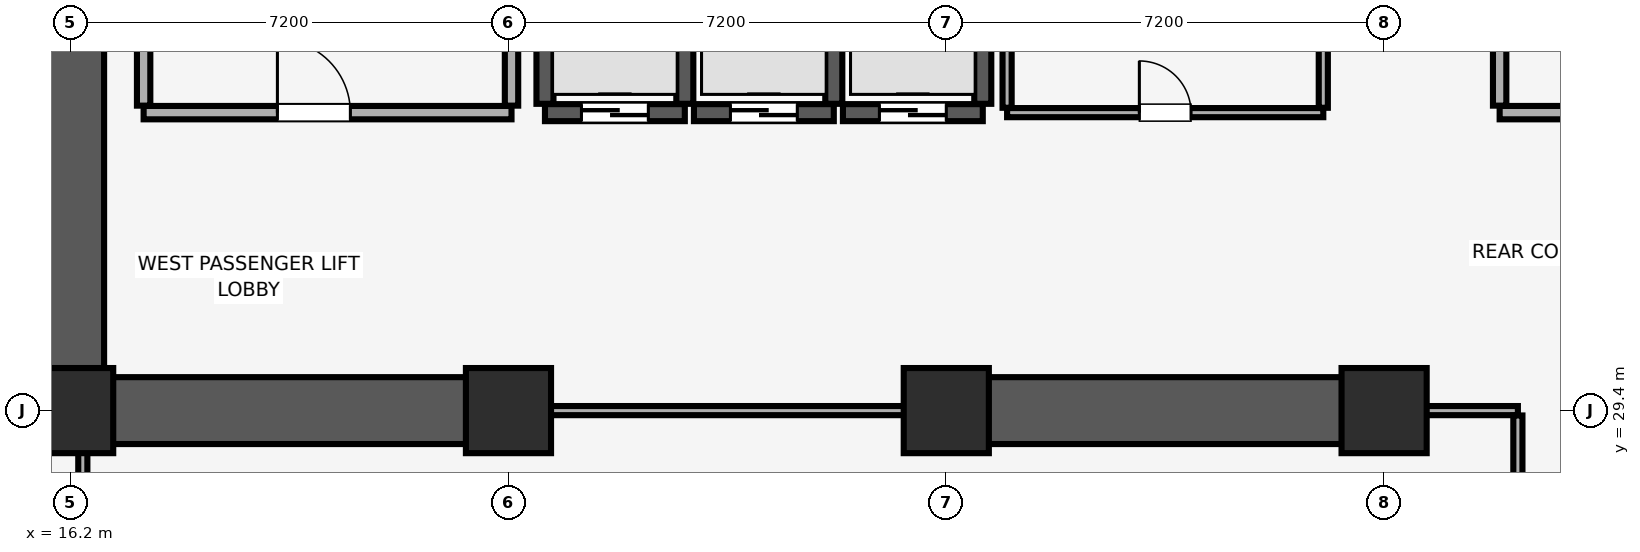
"""IFC4 building model, lengths in metres.
Left out: names, types, materials, properties, quantities, classifications, styles, units other than length and angle.
Written with IfcOpenShell. Run it as: python <this file> out.ifc"""

import sys

from ifc_helpers import new_model, si_unit, direction, frame, frame_2d, origin, origin_2d, place, context, subcontext, project, spatial, rectangle, extrude, element, fill, save


model = new_model("IFC4")
c1 = context("Model", 3, precision=1e-05, world=origin(), true_north=direction((0.0, 1.0)))
c2 = subcontext(c1, "Body", "Model", "MODEL_VIEW")
j1 = project(units=[si_unit("LENGTHUNIT", "METRE"), si_unit("PLANEANGLEUNIT", "RADIAN")], contexts=[c1])
p1 = place(None, origin())
s1 = spatial("IfcSite", under=j1, at=p1, CompositionType="ELEMENT")
p2 = place(p1, origin())
s2 = spatial("IfcBuilding", under=s1, at=p2, CompositionType="ELEMENT")
p3 = place(p2, frame((0.0, 0.0, 26.0)))
s3 = spatial("IfcBuildingStorey", under=s2, at=p3, CompositionType="ELEMENT", Elevation=26.0)
for number, where, z_axis, x_axis in (
    (1, (16.2, 29.4, 0.0), (0.0, 0.0, 1.0), (1.0, 0.0, 0.0)),
    (2, (23.4, 29.4, 0.0), (0.0, 0.0, 1.0), (1.0, 0.0, 0.0)),
    (3, (30.6, 29.4, 0.0), (0.0, 0.0, 1.0), (1.0, 0.0, 0.0)),
    (4, (37.8, 29.4, 0.0), (0.0, 0.0, 1.0), (1.0, 0.0, 0.0)),
):
    element("IfcColumn", number, at=place(p3, frame(where, z_axis=z_axis, x_axis=x_axis)), inside=s3, PredefinedType="COLUMN", context=c2, shape_type="SweptSolid", body=[
        extrude(rectangle(XDim=1.4, YDim=1.4, at=origin_2d()), origin(), (0.0, 0.0, 1.0), 5.16),
    ])
p4 = place(p3, frame((16.2, 29.4, 0.0), z_axis=(0.0, 0.0, 1.0), x_axis=(0.0, 1.0, 0.0)))
e5 = element("IfcWall", 5, at=p4, inside=s3, PredefinedType="SHEAR", context=c2, shape_type="SweptSolid", body=[
    extrude(rectangle(XDim=19.2, YDim=1.1, at=frame_2d((9.6, 0.0))), origin(), (0.0, 0.0, 1.0), 5.12),
])
p5 = place(p3, frame((16.755, 29.4, 0.0), z_axis=(0.0, 0.0, 1.0), x_axis=(1.0, 0.0, 0.0)))
e6 = element("IfcWall", 6, at=p5, inside=s3, PredefinedType="SHEAR", context=c2, shape_type="SweptSolid", body=[
    extrude(rectangle(XDim=6.845, YDim=1.1, at=frame_2d((3.423, 0.0))), origin(), (0.0, 0.0, 1.0), 5.12),
])
p6 = place(p3, frame((30.4, 29.4, 0.0), z_axis=(0.0, 0.0, 1.0), x_axis=(1.0, 0.0, 0.0)))
e7 = element("IfcWall", 7, at=p6, inside=s3, PredefinedType="SHEAR", context=c2, shape_type="SweptSolid", body=[
    extrude(rectangle(XDim=7.6, YDim=1.1, at=frame_2d((3.8, 0.0))), origin(), (0.0, 0.0, 1.0), 5.12),
])
p7 = place(p3, frame((24.0, 34.3, 0.0), z_axis=(0.0, 0.0, 1.0), x_axis=(1.0, 0.0, 0.0)))
e8 = element("IfcWall", 8, at=p7, inside=s3, PredefinedType="SHEAR", context=c2, shape_type="SweptSolid", body=[
    extrude(rectangle(XDim=2.3, YDim=0.28, at=frame_2d((1.15, 0.0))), origin(), (0.0, 0.0, 1.0), 5.12),
])
p8 = place(p7, frame((0.6, 0.0, 0.0)))
e9 = element("IfcOpeningElement", 9, at=p8, cuts=e8, PredefinedType="OPENING", context=c2, shape_type="SweptSolid", body=[
    extrude(rectangle(XDim=1.1, YDim=2.2, at=frame_2d((0.55, 1.1))), frame((0.0, 0.15, 0.0), z_axis=(0.0, -1.0, 0.0), x_axis=(1.0, 0.0, 0.0)), (0.0, 0.0, 1.0), 0.3),
])
for number, where, z_axis, x_axis in (
    (10, (24.0, 34.445, 0.0), (0.0, 0.0, 1.0), (0.0, 1.0, 0.0)),
    (11, (26.3, 34.445, 0.0), (0.0, 0.0, 1.0), (0.0, 1.0, 0.0)),
):
    element("IfcWall", number, at=place(p3, frame(where, z_axis=z_axis, x_axis=x_axis)), inside=s3, PredefinedType="SHEAR", context=c2, shape_type="SweptSolid", body=[
        extrude(rectangle(XDim=2.01, YDim=0.28, at=frame_2d((1.005, 0.0))), origin(), (0.0, 0.0, 1.0), 5.12),
    ])
p9 = place(p3, frame((26.45, 34.3, 0.0), z_axis=(0.0, 0.0, 1.0), x_axis=(1.0, 0.0, 0.0)))
e12 = element("IfcWall", 12, at=p9, inside=s3, PredefinedType="SHEAR", context=c2, shape_type="SweptSolid", body=[
    extrude(rectangle(XDim=2.3, YDim=0.28, at=frame_2d((1.15, 0.0))), origin(), (0.0, 0.0, 1.0), 5.12),
])
p10 = place(p9, frame((0.6, 0.0, 0.0)))
e13 = element("IfcOpeningElement", 13, at=p10, cuts=e12, PredefinedType="OPENING", context=c2, shape_type="SweptSolid", body=[
    extrude(rectangle(XDim=1.1, YDim=2.2, at=frame_2d((0.55, 1.1))), frame((0.0, 0.15, 0.0), z_axis=(0.0, -1.0, 0.0), x_axis=(1.0, 0.0, 0.0)), (0.0, 0.0, 1.0), 0.3),
])
p11 = place(p3, frame((28.75, 34.445, 0.0), z_axis=(0.0, 0.0, 1.0), x_axis=(0.0, 1.0, 0.0)))
e14 = element("IfcWall", 14, at=p11, inside=s3, PredefinedType="SHEAR", context=c2, shape_type="SweptSolid", body=[
    extrude(rectangle(XDim=2.01, YDim=0.28, at=frame_2d((1.005, 0.0))), origin(), (0.0, 0.0, 1.0), 5.12),
])
p12 = place(p3, frame((28.9, 34.3, 0.0), z_axis=(0.0, 0.0, 1.0), x_axis=(1.0, 0.0, 0.0)))
e15 = element("IfcWall", 15, at=p12, inside=s3, PredefinedType="SHEAR", context=c2, shape_type="SweptSolid", body=[
    extrude(rectangle(XDim=2.3, YDim=0.28, at=frame_2d((1.15, 0.0))), origin(), (0.0, 0.0, 1.0), 5.12),
])
p13 = place(p12, frame((0.6, 0.0, 0.0)))
e16 = element("IfcOpeningElement", 16, at=p13, cuts=e15, PredefinedType="OPENING", context=c2, shape_type="SweptSolid", body=[
    extrude(rectangle(XDim=1.1, YDim=2.2, at=frame_2d((0.55, 1.1))), frame((0.0, 0.15, 0.0), z_axis=(0.0, -1.0, 0.0), x_axis=(1.0, 0.0, 0.0)), (0.0, 0.0, 1.0), 0.3),
])
p14 = place(p3, frame((31.2, 34.445, 0.0), z_axis=(0.0, 0.0, 1.0), x_axis=(0.0, 1.0, 0.0)))
e17 = element("IfcWall", 17, at=p14, inside=s3, PredefinedType="SHEAR", context=c2, shape_type="SweptSolid", body=[
    extrude(rectangle(XDim=2.01, YDim=0.28, at=frame_2d((1.005, 0.0))), origin(), (0.0, 0.0, 1.0), 5.12),
])
p15 = place(p3, frame((17.4, 34.3, 0.0), z_axis=(0.0, 0.0, 1.0), x_axis=(1.0, 0.0, 0.0)))
e18 = element("IfcWall", 18, at=p15, inside=s3, PredefinedType="PARTITIONING", context=c2, shape_type="SweptSolid", body=[
    extrude(rectangle(XDim=6.05, YDim=0.22, at=frame_2d((3.025, 0.0))), origin(), (0.0, 0.0, 1.0), 5.12),
])
p16 = place(p15, frame((2.2, 0.0, 0.0)))
e19 = element("IfcOpeningElement", 19, at=p16, cuts=e18, PredefinedType="OPENING", context=c2, shape_type="SweptSolid", body=[
    extrude(rectangle(XDim=1.2, YDim=2.15, at=frame_2d((0.6, 1.075))), frame((0.0, 0.12, 0.0), z_axis=(0.0, -1.0, 0.0), x_axis=(1.0, 0.0, 0.0)), (0.0, 0.0, 1.0), 0.24),
])
p17 = place(p3, frame((17.4, 34.415, 0.0), z_axis=(0.0, 0.0, 1.0), x_axis=(0.0, 1.0, 0.0)))
e20 = element("IfcWall", 20, at=p17, inside=s3, PredefinedType="PARTITIONING", context=c2, shape_type="SweptSolid", body=[
    extrude(rectangle(XDim=5.43, YDim=0.22, at=frame_2d((2.715, 0.0))), origin(), (0.0, 0.0, 1.0), 5.12),
])
p18 = place(p3, frame((23.45, 34.415, 0.0), z_axis=(0.0, 0.0, 1.0), x_axis=(0.0, 1.0, 0.0)))
e21 = element("IfcWall", 21, at=p18, inside=s3, PredefinedType="PARTITIONING", context=c2, shape_type="SweptSolid", body=[
    extrude(rectangle(XDim=5.64, YDim=0.22, at=frame_2d((2.82, 0.0))), origin(), (0.0, 0.0, 1.0), 5.12),
])
p19 = place(p3, frame((39.7, 34.3, 0.0), z_axis=(0.0, 0.0, 1.0), x_axis=(1.0, 0.0, 0.0)))
e22 = element("IfcWall", 22, at=p19, inside=s3, PredefinedType="PARTITIONING", context=c2, shape_type="SweptSolid", body=[
    extrude(rectangle(XDim=4.6, YDim=0.22, at=frame_2d((2.3, 0.0))), origin(), (0.0, 0.0, 1.0), 5.12),
])
p20 = place(p19, frame((1.7, 0.0, 0.0)))
e23 = element("IfcOpeningElement", 23, at=p20, cuts=e22, PredefinedType="OPENING", context=c2, shape_type="SweptSolid", body=[
    extrude(rectangle(XDim=1.2, YDim=2.15, at=frame_2d((0.6, 1.075))), frame((0.0, 0.12, 0.0), z_axis=(0.0, -1.0, 0.0), x_axis=(1.0, 0.0, 0.0)), (0.0, 0.0, 1.0), 0.24),
])
p21 = place(p3, frame((39.7, 34.415, 0.0), z_axis=(0.0, 0.0, 1.0), x_axis=(0.0, 1.0, 0.0)))
e24 = element("IfcWall", 24, at=p21, inside=s3, PredefinedType="PARTITIONING", context=c2, shape_type="SweptSolid", body=[
    extrude(rectangle(XDim=5.785, YDim=0.22, at=frame_2d((2.893, 0.0))), origin(), (0.0, 0.0, 1.0), 5.12),
])
p22 = place(p3, frame((31.6, 34.3, 0.0), z_axis=(0.0, 0.0, 1.0), x_axis=(1.0, 0.0, 0.0)))
e25 = element("IfcWall", 25, at=p22, inside=s3, PredefinedType="PARTITIONING", context=c2, shape_type="SweptSolid", body=[
    extrude(rectangle(XDim=5.2, YDim=0.15, at=frame_2d((2.6, 0.0))), origin(), (0.0, 0.0, 1.0), 5.12),
])
p23 = place(p22, frame((2.175, 0.0, 0.0)))
e26 = element("IfcOpeningElement", 26, at=p23, cuts=e25, PredefinedType="OPENING", context=c2, shape_type="SweptSolid", body=[
    extrude(rectangle(XDim=0.85, YDim=2.1, at=frame_2d((0.425, 1.05))), frame((0.0, 0.085, 0.0), z_axis=(0.0, -1.0, 0.0), x_axis=(1.0, 0.0, 0.0)), (0.0, 0.0, 1.0), 0.17),
])
for number, where, z_axis, x_axis in (
    (27, (31.6, 34.38, 0.0), (0.0, 0.0, 1.0), (0.0, 1.0, 0.0)),
    (28, (36.8, 34.38, 0.0), (0.0, 0.0, 1.0), (0.0, 1.0, 0.0)),
):
    element("IfcWall", number, at=place(p3, frame(where, z_axis=z_axis, x_axis=x_axis)), inside=s3, PredefinedType="PARTITIONING", context=c2, shape_type="SweptSolid", body=[
        extrude(rectangle(XDim=4.94, YDim=0.15, at=frame_2d((2.47, 0.0))), origin(), (0.0, 0.0, 1.0), 5.12),
    ])
p24 = place(p3, frame((23.61, 29.4, 0.0), z_axis=(0.0, 0.0, 1.0), x_axis=(1.0, 0.0, 0.0)))
e29 = element("IfcWall", 29, at=p24, inside=s3, PredefinedType="PARTITIONING", context=c2, shape_type="SweptSolid", body=[
    extrude(rectangle(XDim=6.78, YDim=0.15, at=frame_2d((3.39, 0.0))), origin(), (0.0, 0.0, 1.0), 4.06),
])
p25 = place(p3, frame((38.01, 29.4, 0.0), z_axis=(0.0, 0.0, 1.0), x_axis=(1.0, 0.0, 0.0)))
e30 = element("IfcWall", 30, at=p25, inside=s3, PredefinedType="PARTITIONING", context=c2, shape_type="SweptSolid", body=[
    extrude(rectangle(XDim=1.99, YDim=0.15, at=frame_2d((0.995, 0.0))), origin(), (0.0, 0.0, 1.0), 4.06),
])
p26 = place(p3, frame((16.4, 23.88, 0.0), z_axis=(0.0, 0.0, 1.0), x_axis=(0.0, 1.0, 0.0)))
e31 = element("IfcWall", 31, at=p26, inside=s3, PredefinedType="PARTITIONING", context=c2, shape_type="SweptSolid", body=[
    extrude(rectangle(XDim=5.51, YDim=0.15, at=frame_2d((2.755, 0.0))), origin(), (0.0, 0.0, 1.0), 4.627),
])
p27 = place(p3, frame((40.0, 23.88, 0.0), z_axis=(0.0, 0.0, 1.0), x_axis=(0.0, 1.0, 0.0)))
e32 = element("IfcWall", 32, at=p27, inside=s3, PredefinedType="PARTITIONING", context=c2, shape_type="SweptSolid", body=[
    extrude(rectangle(XDim=5.44, YDim=0.15, at=frame_2d((2.72, 0.0))), origin(), (0.0, 0.0, 1.0), 5.12),
])
p28 = place(p8, origin())
e33 = element("IfcDoor", 33, at=p28, inside=s3, OperationType="DOUBLE_DOOR_SLIDING", PredefinedType="DOOR", context=c2, shape_type="SweptSolid", body=[
    extrude(rectangle(XDim=1.1, YDim=2.2, at=frame_2d((0.55, 1.1))), frame((0.0, 0.025, 0.0), z_axis=(0.0, -1.0, 0.0), x_axis=(1.0, 0.0, 0.0)), (0.0, 0.0, 1.0), 0.05),
])
fill(e9, e33)
p29 = place(p10, origin())
e34 = element("IfcDoor", 34, at=p29, inside=s3, OperationType="DOUBLE_DOOR_SLIDING", PredefinedType="DOOR", context=c2, shape_type="SweptSolid", body=[
    extrude(rectangle(XDim=1.1, YDim=2.2, at=frame_2d((0.55, 1.1))), frame((0.0, 0.025, 0.0), z_axis=(0.0, -1.0, 0.0), x_axis=(1.0, 0.0, 0.0)), (0.0, 0.0, 1.0), 0.05),
])
fill(e13, e34)
p30 = place(p13, origin())
e35 = element("IfcDoor", 35, at=p30, inside=s3, OperationType="DOUBLE_DOOR_SLIDING", PredefinedType="DOOR", context=c2, shape_type="SweptSolid", body=[
    extrude(rectangle(XDim=1.1, YDim=2.2, at=frame_2d((0.55, 1.1))), frame((0.0, 0.025, 0.0), z_axis=(0.0, -1.0, 0.0), x_axis=(1.0, 0.0, 0.0)), (0.0, 0.0, 1.0), 0.05),
])
fill(e16, e35)
p31 = place(p16, origin())
e36 = element("IfcDoor", 36, at=p31, inside=s3, OperationType="SINGLE_SWING_LEFT", PredefinedType="DOOR", context=c2, shape_type="SweptSolid", body=[
    extrude(rectangle(XDim=1.2, YDim=2.15, at=frame_2d((0.6, 1.075))), frame((0.0, 0.025, 0.0), z_axis=(0.0, -1.0, 0.0), x_axis=(1.0, 0.0, 0.0)), (0.0, 0.0, 1.0), 0.05),
])
fill(e19, e36)
p32 = place(p23, origin())
e37 = element("IfcDoor", 37, at=p32, inside=s3, OperationType="SINGLE_SWING_LEFT", PredefinedType="DOOR", context=c2, shape_type="SweptSolid", body=[
    extrude(rectangle(XDim=0.85, YDim=2.1, at=frame_2d((0.425, 1.05))), frame((0.0, 0.025, 0.0), z_axis=(0.0, -1.0, 0.0), x_axis=(1.0, 0.0, 0.0)), (0.0, 0.0, 1.0), 0.05),
])
fill(e26, e37)
save(model, sys.argv[1])
